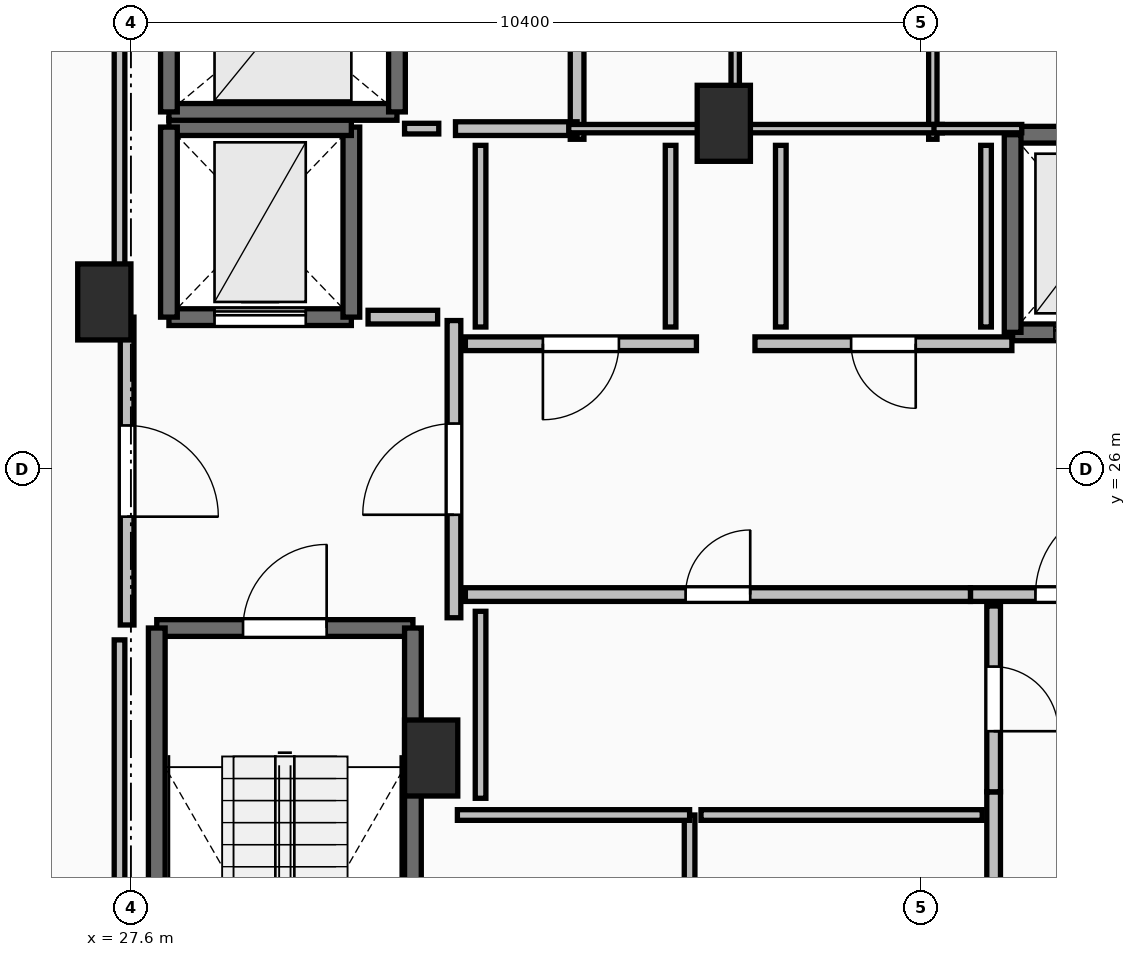
"""IFC4 building model, lengths in metres.
Left out: names, types, materials, properties, quantities, classifications, styles, units other than length and angle.
Written with IfcOpenShell. Run it as: python <this file> out.ifc"""

import sys

from ifc_helpers import new_model, si_unit, direction, frame, frame_2d, origin, origin_2d, place, context, subcontext, project, spatial, rectangle, extrude, element, fill, save


model = new_model("IFC4")
c1 = context("Model", 3, precision=1e-05, world=origin(), true_north=direction((0.0, 1.0)))
c2 = subcontext(c1, "Body", "Model", "MODEL_VIEW")
j1 = project(units=[si_unit("LENGTHUNIT", "METRE"), si_unit("PLANEANGLEUNIT", "RADIAN")], contexts=[c1])
p1 = place(None, origin())
s1 = spatial("IfcSite", under=j1, at=p1, CompositionType="ELEMENT")
p2 = place(p1, origin())
s2 = spatial("IfcBuilding", under=s1, at=p2, CompositionType="ELEMENT")
p3 = place(p2, frame((0.0, 0.0, 244.9)))
s3 = spatial("IfcBuildingStorey", under=s2, at=p3, CompositionType="ELEMENT", Elevation=244.9)
for number, where, z_axis, x_axis in (
    (1, (27.25, 28.2, 0.0), (0.0, 0.0, 1.0), (1.0, 0.0, 0.0)),
    (2, (31.55, 22.2, 0.0), (0.0, 0.0, 1.0), (1.0, 0.0, 0.0)),
    (3, (35.4, 30.55, 0.0), (0.0, 0.0, 1.0), (1.0, 0.0, 0.0)),
):
    element("IfcColumn", number, at=place(p3, frame(where, z_axis=z_axis, x_axis=x_axis)), inside=s3, PredefinedType="PILASTER", context=c2, shape_type="SweptSolid", body=[
        extrude(rectangle(XDim=0.7, YDim=1.0, at=origin_2d()), origin(), (0.0, 0.0, 1.0), 3.55),
    ])
p4 = place(p3, frame((27.94, 23.91, 0.0), z_axis=(0.0, 0.0, 1.0), x_axis=(1.0, 0.0, 0.0)))
e4 = element("IfcWall", 4, at=p4, inside=s3, PredefinedType="SOLIDWALL", context=c2, shape_type="SweptSolid", body=[
    extrude(rectangle(XDim=3.37, YDim=0.22, at=frame_2d((1.685, 0.0))), origin(), (0.0, 0.0, 1.0), 3.29),
])
p5 = place(p4, frame((1.135, 0.0, 0.0)))
e5 = element("IfcOpeningElement", 5, at=p5, cuts=e4, PredefinedType="OPENING", context=c2, shape_type="SweptSolid", body=[
    extrude(rectangle(XDim=1.1, YDim=2.15, at=frame_2d((0.55, 1.075))), frame((0.0, 0.125, 0.0), z_axis=(0.0, -1.0, 0.0), x_axis=(1.0, 0.0, 0.0)), (0.0, 0.0, 1.0), 0.25),
])
for number, where, z_axis, x_axis in (
    (6, (31.31, 23.91, 0.0), (0.0, 0.0, 1.0), (0.0, -1.0, 0.0)),
    (7, (27.94, 16.49, 0.0), (0.0, 0.0, 1.0), (0.0, 1.0, 0.0)),
):
    element("IfcWall", number, at=place(p3, frame(where, z_axis=z_axis, x_axis=x_axis)), inside=s3, PredefinedType="SOLIDWALL", context=c2, shape_type="SweptSolid", body=[
        extrude(rectangle(XDim=7.42, YDim=0.22, at=frame_2d((3.71, 0.0))), origin(), (0.0, 0.0, 1.0), 3.29),
    ])
p6 = place(p3, frame((39.2, 27.8, 0.0), z_axis=(0.0, 0.0, 1.0), x_axis=(1.0, 0.0, 0.0)))
e8 = element("IfcWall", 8, at=p6, inside=s3, PredefinedType="SOLIDWALL", context=c2, shape_type="SweptSolid", body=[
    extrude(rectangle(XDim=2.2, YDim=0.22, at=frame_2d((1.1, 0.0))), origin(), (0.0, 0.0, 1.0), 3.29),
])
p7 = place(p6, frame((0.55, 0.0, 0.0)))
e9 = element("IfcOpeningElement", 9, at=p7, cuts=e8, PredefinedType="OPENING", context=c2, shape_type="SweptSolid", body=[
    extrude(rectangle(XDim=1.1, YDim=2.2, at=frame_2d((0.55, 1.1))), frame((0.0, 0.125, 0.0), z_axis=(0.0, -1.0, 0.0), x_axis=(1.0, 0.0, 0.0)), (0.0, 0.0, 1.0), 0.25),
])
p8 = place(p3, frame((41.4, 30.4, 0.0), z_axis=(0.0, 0.0, 1.0), x_axis=(-1.0, 0.0, 0.0)))
e10 = element("IfcWall", 10, at=p8, inside=s3, PredefinedType="SOLIDWALL", context=c2, shape_type="SweptSolid", body=[
    extrude(rectangle(XDim=2.2, YDim=0.22, at=frame_2d((1.1, 0.0))), origin(), (0.0, 0.0, 1.0), 3.29),
])
p9 = place(p3, frame((39.2, 30.4, 0.0), z_axis=(0.0, 0.0, 1.0), x_axis=(0.0, -1.0, 0.0)))
e11 = element("IfcWall", 11, at=p9, inside=s3, PredefinedType="SOLIDWALL", context=c2, shape_type="SweptSolid", body=[
    extrude(rectangle(XDim=2.6, YDim=0.22, at=frame_2d((1.3, 0.0))), origin(), (0.0, 0.0, 1.0), 3.29),
])
p10 = place(p3, frame((28.1, 28.0, 0.0), z_axis=(0.0, 0.0, 1.0), x_axis=(1.0, 0.0, 0.0)))
e12 = element("IfcWall", 12, at=p10, inside=s3, PredefinedType="SHEAR", context=c2, shape_type="SweptSolid", body=[
    extrude(rectangle(XDim=2.4, YDim=0.22, at=frame_2d((1.2, 0.0))), origin(), (0.0, 0.0, 1.0), 3.29),
])
p11 = place(p10, frame((0.6, 0.0, 0.0)))
e13 = element("IfcOpeningElement", 13, at=p11, cuts=e12, PredefinedType="OPENING", context=c2, shape_type="SweptSolid", body=[
    extrude(rectangle(XDim=1.2, YDim=2.2, at=frame_2d((0.6, 1.1))), frame((0.0, 0.125, 0.0), z_axis=(0.0, -1.0, 0.0), x_axis=(1.0, 0.0, 0.0)), (0.0, 0.0, 1.0), 0.25),
])
p12 = place(p3, frame((30.5, 28.0, 0.0), z_axis=(0.0, 0.0, 1.0), x_axis=(0.0, 1.0, 0.0)))
e14 = element("IfcWall", 14, at=p12, inside=s3, PredefinedType="SHEAR", context=c2, shape_type="SweptSolid", body=[
    extrude(rectangle(XDim=2.5, YDim=0.22, at=frame_2d((1.25, 0.0))), origin(), (0.0, 0.0, 1.0), 3.29),
])
p13 = place(p3, frame((30.5, 30.5, 0.0), z_axis=(0.0, 0.0, 1.0), x_axis=(-1.0, 0.0, 0.0)))
e15 = element("IfcWall", 15, at=p13, inside=s3, PredefinedType="SHEAR", context=c2, shape_type="SweptSolid", body=[
    extrude(rectangle(XDim=2.4, YDim=0.22, at=frame_2d((1.2, 0.0))), origin(), (0.0, 0.0, 1.0), 3.29),
])
p14 = place(p3, frame((28.1, 30.5, 0.0), z_axis=(0.0, 0.0, 1.0), x_axis=(0.0, -1.0, 0.0)))
e16 = element("IfcWall", 16, at=p14, inside=s3, PredefinedType="SHEAR", context=c2, shape_type="SweptSolid", body=[
    extrude(rectangle(XDim=2.5, YDim=0.22, at=frame_2d((1.25, 0.0))), origin(), (0.0, 0.0, 1.0), 3.29),
])
p15 = place(p3, frame((28.1, 30.7, 0.0), z_axis=(0.0, 0.0, 1.0), x_axis=(1.0, 0.0, 0.0)))
e17 = element("IfcWall", 17, at=p15, inside=s3, PredefinedType="SOLIDWALL", context=c2, shape_type="SweptSolid", body=[
    extrude(rectangle(XDim=3.0, YDim=0.22, at=frame_2d((1.5, 0.0))), origin(), (0.0, 0.0, 1.0), 3.29),
])
for number, where, z_axis, x_axis in (
    (18, (31.1, 30.7, 0.0), (0.0, 0.0, 1.0), (0.0, 1.0, 0.0)),
    (19, (28.1, 33.2, 0.0), (0.0, 0.0, 1.0), (0.0, -1.0, 0.0)),
):
    element("IfcWall", number, at=place(p3, frame(where, z_axis=z_axis, x_axis=x_axis)), inside=s3, PredefinedType="SOLIDWALL", context=c2, shape_type="SweptSolid", body=[
        extrude(rectangle(XDim=2.5, YDim=0.22, at=frame_2d((1.25, 0.0))), origin(), (0.0, 0.0, 1.0), 3.29),
    ])
p16 = place(p3, frame((31.85, 24.045, 0.0), z_axis=(0.0, 0.0, 1.0), x_axis=(0.0, 1.0, 0.0)))
e20 = element("IfcWall", 20, at=p16, inside=s3, PredefinedType="PARTITIONING", context=c2, shape_type="SweptSolid", body=[
    extrude(rectangle(XDim=3.91, YDim=0.18, at=frame_2d((1.955, 0.0))), origin(), (0.0, 0.0, 1.0), 3.29),
])
p17 = place(p16, frame((1.355, 0.0, 0.0)))
e21 = element("IfcOpeningElement", 21, at=p17, cuts=e20, PredefinedType="OPENING", context=c2, shape_type="SweptSolid", body=[
    extrude(rectangle(XDim=1.2, YDim=2.15, at=frame_2d((0.6, 1.075))), frame((0.0, 0.105, 0.0), z_axis=(0.0, -1.0, 0.0), x_axis=(1.0, 0.0, 0.0)), (0.0, 0.0, 1.0), 0.21),
])
p18 = place(p3, frame((27.55, 28.0, 0.0), z_axis=(0.0, 0.0, 1.0), x_axis=(0.0, -1.0, 0.0)))
e22 = element("IfcWall", 22, at=p18, inside=s3, PredefinedType="PARTITIONING", context=c2, shape_type="SweptSolid", body=[
    extrude(rectangle(XDim=4.05, YDim=0.18, at=frame_2d((2.025, 0.0))), origin(), (0.0, 0.0, 1.0), 3.29),
])
p19 = place(p18, frame((1.425, 0.0, 0.0)))
e23 = element("IfcOpeningElement", 23, at=p19, cuts=e22, PredefinedType="OPENING", context=c2, shape_type="SweptSolid", body=[
    extrude(rectangle(XDim=1.2, YDim=2.15, at=frame_2d((0.6, 1.075))), frame((0.0, 0.105, 0.0), z_axis=(0.0, -1.0, 0.0), x_axis=(1.0, 0.0, 0.0)), (0.0, 0.0, 1.0), 0.21),
])
p20 = place(p3, frame((33.47, 30.34, 0.0), z_axis=(0.0, 0.0, 1.0), x_axis=(0.0, 1.0, 0.0)))
e24 = element("IfcWall", 24, at=p20, inside=s3, PredefinedType="PARTITIONING", context=c2, shape_type="SweptSolid", body=[
    extrude(rectangle(XDim=3.56, YDim=0.18, at=frame_2d((1.78, 0.0))), origin(), (0.0, 0.0, 1.0), 3.29),
])
p21 = place(p3, frame((31.87, 30.48, 0.0), z_axis=(0.0, 0.0, 1.0), x_axis=(1.0, 0.0, 0.0)))
e25 = element("IfcWall", 25, at=p21, inside=s3, PredefinedType="PARTITIONING", context=c2, shape_type="SweptSolid", body=[
    extrude(rectangle(XDim=1.6, YDim=0.18, at=frame_2d((0.8, 0.0))), origin(), (0.0, 0.0, 1.0), 3.29),
])
p22 = place(p3, frame((38.645, 24.35, 0.0), z_axis=(0.0, 0.0, 1.0), x_axis=(1.0, 0.0, 0.0)))
e26 = element("IfcWall", 26, at=p22, inside=s3, PredefinedType="PARTITIONING", context=c2, shape_type="SweptSolid", body=[
    extrude(rectangle(XDim=2.91, YDim=0.18, at=frame_2d((1.455, 0.0))), origin(), (0.0, 0.0, 1.0), 3.29),
])
p23 = place(p22, frame((0.855, 0.0, 0.0)))
e27 = element("IfcOpeningElement", 27, at=p23, cuts=e26, PredefinedType="OPENING", context=c2, shape_type="SweptSolid", body=[
    extrude(rectangle(XDim=1.2, YDim=2.15, at=frame_2d((0.6, 1.075))), frame((0.0, 0.105, 0.0), z_axis=(0.0, -1.0, 0.0), x_axis=(1.0, 0.0, 0.0)), (0.0, 0.0, 1.0), 0.21),
])
p24 = place(p3, frame((35.04, 27.65, 0.0), z_axis=(0.0, 0.0, 1.0), x_axis=(-1.0, 0.0, 0.0)))
e28 = element("IfcWall", 28, at=p24, inside=s3, PredefinedType="PARTITIONING", context=c2, shape_type="SweptSolid", body=[
    extrude(rectangle(XDim=3.04, YDim=0.18, at=frame_2d((1.52, 0.0))), origin(), (0.0, 0.0, 1.0), 3.29),
])
p25 = place(p24, frame((1.02, 0.0, 0.0)))
e29 = element("IfcOpeningElement", 29, at=p25, cuts=e28, PredefinedType="OPENING", context=c2, shape_type="SweptSolid", body=[
    extrude(rectangle(XDim=1.0, YDim=2.15, at=frame_2d((0.5, 1.075))), frame((0.0, 0.105, 0.0), z_axis=(0.0, -1.0, 0.0), x_axis=(1.0, 0.0, 0.0)), (0.0, 0.0, 1.0), 0.21),
])
p26 = place(p3, frame((39.19, 27.65, 0.0), z_axis=(0.0, 0.0, 1.0), x_axis=(-1.0, 0.0, 0.0)))
e30 = element("IfcWall", 30, at=p26, inside=s3, PredefinedType="PARTITIONING", context=c2, shape_type="SweptSolid", body=[
    extrude(rectangle(XDim=3.38, YDim=0.18, at=frame_2d((1.69, 0.0))), origin(), (0.0, 0.0, 1.0), 3.29),
])
p27 = place(p26, frame((1.265, 0.0, 0.0)))
e31 = element("IfcOpeningElement", 31, at=p27, cuts=e30, PredefinedType="OPENING", context=c2, shape_type="SweptSolid", body=[
    extrude(rectangle(XDim=0.85, YDim=2.1, at=frame_2d((0.425, 1.05))), frame((0.0, 0.105, 0.0), z_axis=(0.0, -1.0, 0.0), x_axis=(1.0, 0.0, 0.0)), (0.0, 0.0, 1.0), 0.21),
])
p28 = place(p3, frame((32.0, 24.35, 0.0), z_axis=(0.0, 0.0, 1.0), x_axis=(1.0, 0.0, 0.0)))
e32 = element("IfcWall", 32, at=p28, inside=s3, PredefinedType="PARTITIONING", context=c2, shape_type="SweptSolid", body=[
    extrude(rectangle(XDim=6.645, YDim=0.18, at=frame_2d((3.323, 0.0))), origin(), (0.0, 0.0, 1.0), 3.29),
])
p29 = place(p28, frame((2.897, 0.0, 0.0)))
e33 = element("IfcOpeningElement", 33, at=p29, cuts=e32, PredefinedType="OPENING", context=c2, shape_type="SweptSolid", body=[
    extrude(rectangle(XDim=0.85, YDim=2.1, at=frame_2d((0.425, 1.05))), frame((0.0, 0.105, 0.0), z_axis=(0.0, -1.0, 0.0), x_axis=(1.0, 0.0, 0.0)), (0.0, 0.0, 1.0), 0.21),
])
p30 = place(p3, frame((38.95, 21.755, 0.0), z_axis=(0.0, 0.0, 1.0), x_axis=(0.0, -1.0, 0.0)))
e34 = element("IfcWall", 34, at=p30, inside=s3, PredefinedType="PARTITIONING", context=c2, shape_type="SweptSolid", body=[
    extrude(rectangle(XDim=5.435, YDim=0.18, at=frame_2d((2.717, 0.0))), origin(), (0.0, 0.0, 1.0), 3.29),
])
p31 = place(p30, frame((2.218, 0.0, 0.0)))
e35 = element("IfcOpeningElement", 35, at=p31, cuts=e34, PredefinedType="OPENING", context=c2, shape_type="SweptSolid", body=[
    extrude(rectangle(XDim=1.0, YDim=2.15, at=frame_2d((0.5, 1.075))), frame((0.0, 0.105, 0.0), z_axis=(0.0, -1.0, 0.0), x_axis=(1.0, 0.0, 0.0)), (0.0, 0.0, 1.0), 0.21),
])
p32 = place(p3, frame((38.95, 24.2, 0.0), z_axis=(0.0, 0.0, 1.0), x_axis=(0.0, -1.0, 0.0)))
e36 = element("IfcWall", 36, at=p32, inside=s3, PredefinedType="PARTITIONING", context=c2, shape_type="SweptSolid", body=[
    extrude(rectangle(XDim=2.445, YDim=0.18, at=frame_2d((1.223, 0.0))), origin(), (0.0, 0.0, 1.0), 2.482),
])
p33 = place(p32, frame((0.798, 0.0, 0.0)))
e37 = element("IfcOpeningElement", 37, at=p33, cuts=e36, PredefinedType="OPENING", context=c2, shape_type="SweptSolid", body=[
    extrude(rectangle(XDim=0.85, YDim=2.1, at=frame_2d((0.425, 1.05))), frame((0.0, 0.105, 0.0), z_axis=(0.0, -1.0, 0.0), x_axis=(1.0, 0.0, 0.0)), (0.0, 0.0, 1.0), 0.21),
])
p34 = place(p3, frame((35.55, 30.34, 0.0), z_axis=(0.0, 0.0, 1.0), x_axis=(0.0, 1.0, 0.0)))
e38 = element("IfcWall", 38, at=p34, inside=s3, PredefinedType="PARTITIONING", context=c2, shape_type="SweptSolid", body=[
    extrude(rectangle(XDim=3.56, YDim=0.11, at=frame_2d((1.78, 0.0))), origin(), (0.0, 0.0, 1.0), 2.482),
])
p35 = place(p3, frame((33.36, 30.48, 0.0), z_axis=(0.0, 0.0, 1.0), x_axis=(1.0, 0.0, 0.0)))
e39 = element("IfcWall", 39, at=p35, inside=s3, PredefinedType="PARTITIONING", context=c2, shape_type="SweptSolid", body=[
    extrude(rectangle(XDim=1.81, YDim=0.11, at=frame_2d((0.905, 0.0))), origin(), (0.0, 0.0, 1.0), 3.29),
])
p36 = place(p3, frame((38.15, 30.34, 0.0), z_axis=(0.0, 0.0, 1.0), x_axis=(0.0, 1.0, 0.0)))
e40 = element("IfcWall", 40, at=p36, inside=s3, PredefinedType="PARTITIONING", context=c2, shape_type="SweptSolid", body=[
    extrude(rectangle(XDim=3.56, YDim=0.11, at=frame_2d((1.78, 0.0))), origin(), (0.0, 0.0, 1.0), 2.482),
])
p37 = place(p3, frame((35.68, 30.48, 0.0), z_axis=(0.0, 0.0, 1.0), x_axis=(1.0, 0.0, 0.0)))
e41 = element("IfcWall", 41, at=p37, inside=s3, PredefinedType="PARTITIONING", context=c2, shape_type="SweptSolid", body=[
    extrude(rectangle(XDim=2.595, YDim=0.11, at=frame_2d((1.297, 0.0))), origin(), (0.0, 0.0, 1.0), 2.482),
])
p38 = place(p3, frame((38.165, 30.48, 0.0), z_axis=(0.0, 0.0, 1.0), x_axis=(1.0, 0.0, 0.0)))
e42 = element("IfcWall", 42, at=p38, inside=s3, PredefinedType="PARTITIONING", context=c2, shape_type="SweptSolid", body=[
    extrude(rectangle(XDim=1.155, YDim=0.11, at=frame_2d((0.578, 0.0))), origin(), (0.0, 0.0, 1.0), 2.482),
])
p39 = place(p3, frame((34.95, 16.32, 0.0), z_axis=(0.0, 0.0, 1.0), x_axis=(0.0, 1.0, 0.0)))
e43 = element("IfcWall", 43, at=p39, inside=s3, PredefinedType="PARTITIONING", context=c2, shape_type="SweptSolid", body=[
    extrude(rectangle(XDim=5.13, YDim=0.14, at=frame_2d((2.565, 0.0))), origin(), (0.0, 0.0, 1.0), 3.29),
])
p40 = place(p3, frame((34.95, 21.45, 0.0), z_axis=(0.0, 0.0, 1.0), x_axis=(-1.0, 0.0, 0.0)))
e44 = element("IfcWall", 44, at=p40, inside=s3, PredefinedType="PARTITIONING", context=c2, shape_type="SweptSolid", body=[
    extrude(rectangle(XDim=3.055, YDim=0.14, at=frame_2d((1.527, 0.0))), origin(), (0.0, 0.0, 1.0), 3.29),
])
p41 = place(p3, frame((38.8, 21.45, 0.0), z_axis=(0.0, 0.0, 1.0), x_axis=(-1.0, 0.0, 0.0)))
e45 = element("IfcWall", 45, at=p41, inside=s3, PredefinedType="PARTITIONING", context=c2, shape_type="SweptSolid", body=[
    extrude(rectangle(XDim=3.7, YDim=0.14, at=frame_2d((1.85, 0.0))), origin(), (0.0, 0.0, 1.0), 3.29),
])
p42 = place(p3, frame((31.635, 28.0, 0.0), z_axis=(0.0, 0.0, 1.0), x_axis=(-1.0, 0.0, 0.0)))
e46 = element("IfcWall", 46, at=p42, inside=s3, PredefinedType="PARTITIONING", context=c2, shape_type="SweptSolid", body=[
    extrude(rectangle(XDim=0.915, YDim=0.18, at=frame_2d((0.458, 0.0))), origin(), (0.0, 0.0, 1.0), 3.29),
])
p43 = place(p3, frame((31.2, 30.48, 0.0), z_axis=(0.0, 0.0, 1.0), x_axis=(1.0, 0.0, 0.0)))
e47 = element("IfcWall", 47, at=p43, inside=s3, PredefinedType="PARTITIONING", context=c2, shape_type="SweptSolid", body=[
    extrude(rectangle(XDim=0.45, YDim=0.14, at=frame_2d((0.225, 0.0))), origin(), (0.0, 0.0, 1.0), 3.29),
])
for number, where, z_axis, x_axis in (
    (48, (32.2, 30.26, 0.0), (0.0, 0.0, 1.0), (0.0, -1.0, 0.0)),
    (49, (34.7, 27.87, 0.0), (0.0, 0.0, 1.0), (0.0, 1.0, 0.0)),
    (50, (36.15, 30.26, 0.0), (0.0, 0.0, 1.0), (0.0, -1.0, 0.0)),
    (51, (38.85, 27.87, 0.0), (0.0, 0.0, 1.0), (0.0, 1.0, 0.0)),
):
    element("IfcWall", number, at=place(p3, frame(where, z_axis=z_axis, x_axis=x_axis)), inside=s3, PredefinedType="PARTITIONING", context=c2, shape_type="SweptSolid", body=[
        extrude(rectangle(XDim=2.39, YDim=0.14, at=frame_2d((1.195, 0.0))), origin(), (0.0, 0.0, 1.0), 3.29),
    ])
p44 = place(p3, frame((32.2, 24.13, 0.0), z_axis=(0.0, 0.0, 1.0), x_axis=(0.0, -1.0, 0.0)))
e52 = element("IfcWall", 52, at=p44, inside=s3, PredefinedType="PARTITIONING", context=c2, shape_type="SweptSolid", body=[
    extrude(rectangle(XDim=2.46, YDim=0.14, at=frame_2d((1.23, 0.0))), origin(), (0.0, 0.0, 1.0), 2.482),
])
p45 = place(p3, frame((27.45, 33.45, 0.0), z_axis=(0.0, 0.0, 1.0), x_axis=(0.0, -1.0, 0.0)))
e53 = element("IfcWall", 53, at=p45, inside=s3, PredefinedType="PARTITIONING", context=c2, shape_type="SweptSolid", body=[
    extrude(rectangle(XDim=5.254, YDim=0.14, at=frame_2d((2.627, 0.0))), origin(), (0.0, 0.0, 1.0), 2.482),
])
p46 = place(p3, frame((27.45, 23.754, 0.0), z_axis=(0.0, 0.0, 1.0), x_axis=(0.0, -1.0, 0.0)))
e54 = element("IfcWall", 54, at=p46, inside=s3, PredefinedType="PARTITIONING", context=c2, shape_type="SweptSolid", body=[
    extrude(rectangle(XDim=7.514, YDim=0.14, at=frame_2d((3.757, 0.0))), origin(), (0.0, 0.0, 1.0), 2.482),
])
p47 = place(p5, origin())
e55 = element("IfcDoor", 55, at=p47, inside=s3, OperationType="SINGLE_SWING_RIGHT", PredefinedType="DOOR", context=c2, shape_type="SweptSolid", body=[
    extrude(rectangle(XDim=1.1, YDim=2.15, at=frame_2d((0.55, 1.075))), frame((0.0, 0.025, 0.0), z_axis=(0.0, -1.0, 0.0), x_axis=(1.0, 0.0, 0.0)), (0.0, 0.0, 1.0), 0.05),
])
fill(e5, e55)
p48 = place(p7, origin())
e56 = element("IfcDoor", 56, at=p48, inside=s3, OperationType="SLIDING_TO_LEFT", PredefinedType="DOOR", context=c2, shape_type="SweptSolid", body=[
    extrude(rectangle(XDim=1.1, YDim=2.2, at=frame_2d((0.55, 1.1))), frame((0.0, 0.025, 0.0), z_axis=(0.0, -1.0, 0.0), x_axis=(1.0, 0.0, 0.0)), (0.0, 0.0, 1.0), 0.05),
])
fill(e9, e56)
p49 = place(p11, origin())
e57 = element("IfcDoor", 57, at=p49, inside=s3, OperationType="SLIDING_TO_LEFT", PredefinedType="DOOR", context=c2, shape_type="SweptSolid", body=[
    extrude(rectangle(XDim=1.2, YDim=2.2, at=frame_2d((0.6, 1.1))), frame((0.0, 0.025, 0.0), z_axis=(0.0, -1.0, 0.0), x_axis=(1.0, 0.0, 0.0)), (0.0, 0.0, 1.0), 0.05),
])
fill(e13, e57)
p50 = place(p17, origin())
e58 = element("IfcDoor", 58, at=p50, inside=s3, OperationType="SINGLE_SWING_LEFT", PredefinedType="DOOR", context=c2, shape_type="SweptSolid", body=[
    extrude(rectangle(XDim=1.2, YDim=2.15, at=frame_2d((0.6, 1.075))), frame((0.0, 0.025, 0.0), z_axis=(0.0, -1.0, 0.0), x_axis=(1.0, 0.0, 0.0)), (0.0, 0.0, 1.0), 0.05),
])
fill(e21, e58)
p51 = place(p19, origin())
e59 = element("IfcDoor", 59, at=p51, inside=s3, OperationType="SINGLE_SWING_RIGHT", PredefinedType="DOOR", context=c2, shape_type="SweptSolid", body=[
    extrude(rectangle(XDim=1.2, YDim=2.15, at=frame_2d((0.6, 1.075))), frame((0.0, 0.025, 0.0), z_axis=(0.0, -1.0, 0.0), x_axis=(1.0, 0.0, 0.0)), (0.0, 0.0, 1.0), 0.05),
])
fill(e23, e59)
p52 = place(p23, origin())
e60 = element("IfcDoor", 60, at=p52, inside=s3, OperationType="SINGLE_SWING_RIGHT", PredefinedType="DOOR", context=c2, shape_type="SweptSolid", body=[
    extrude(rectangle(XDim=1.2, YDim=2.15, at=frame_2d((0.6, 1.075))), frame((0.0, 0.025, 0.0), z_axis=(0.0, -1.0, 0.0), x_axis=(1.0, 0.0, 0.0)), (0.0, 0.0, 1.0), 0.05),
])
fill(e27, e60)
p53 = place(p25, origin())
e61 = element("IfcDoor", 61, at=p53, inside=s3, OperationType="SINGLE_SWING_RIGHT", PredefinedType="DOOR", context=c2, shape_type="SweptSolid", body=[
    extrude(rectangle(XDim=1.0, YDim=2.15, at=frame_2d((0.5, 1.075))), frame((0.0, 0.025, 0.0), z_axis=(0.0, -1.0, 0.0), x_axis=(1.0, 0.0, 0.0)), (0.0, 0.0, 1.0), 0.05),
])
fill(e29, e61)
p54 = place(p27, origin())
e62 = element("IfcDoor", 62, at=p54, inside=s3, OperationType="SINGLE_SWING_LEFT", PredefinedType="DOOR", context=c2, shape_type="SweptSolid", body=[
    extrude(rectangle(XDim=0.85, YDim=2.1, at=frame_2d((0.425, 1.05))), frame((0.0, 0.025, 0.0), z_axis=(0.0, -1.0, 0.0), x_axis=(1.0, 0.0, 0.0)), (0.0, 0.0, 1.0), 0.05),
])
fill(e31, e62)
p55 = place(p29, origin())
e63 = element("IfcDoor", 63, at=p55, inside=s3, OperationType="SINGLE_SWING_RIGHT", PredefinedType="DOOR", context=c2, shape_type="SweptSolid", body=[
    extrude(rectangle(XDim=0.85, YDim=2.1, at=frame_2d((0.425, 1.05))), frame((0.0, 0.025, 0.0), z_axis=(0.0, -1.0, 0.0), x_axis=(1.0, 0.0, 0.0)), (0.0, 0.0, 1.0), 0.05),
])
fill(e33, e63)
p56 = place(p33, origin())
e64 = element("IfcDoor", 64, at=p56, inside=s3, OperationType="SINGLE_SWING_RIGHT", PredefinedType="DOOR", context=c2, shape_type="SweptSolid", body=[
    extrude(rectangle(XDim=0.85, YDim=2.1, at=frame_2d((0.425, 1.05))), frame((0.0, 0.025, 0.0), z_axis=(0.0, -1.0, 0.0), x_axis=(1.0, 0.0, 0.0)), (0.0, 0.0, 1.0), 0.05),
])
fill(e37, e64)
save(model, sys.argv[1])
